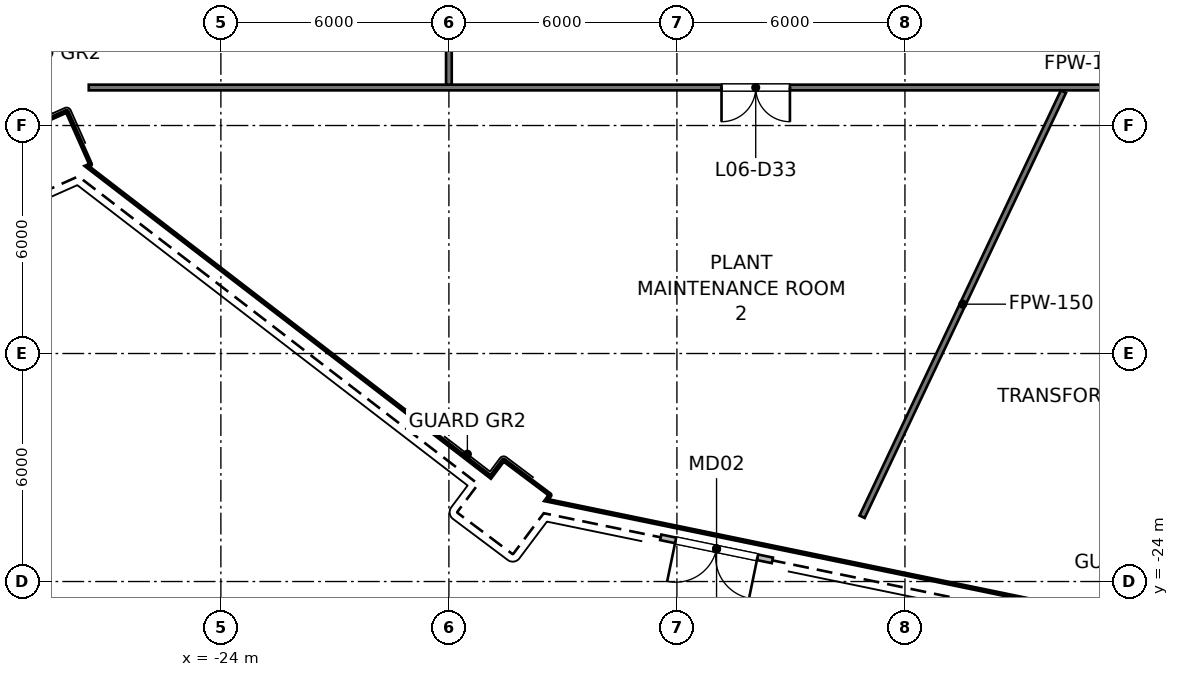
"""IFC4 building model, lengths in metres.
Left out: names, types, materials, properties, quantities, classifications, styles, units other than length and angle.
Written with IfcOpenShell. Run it as: python <this file> out.ifc"""

import sys

from ifc_helpers import new_model, si_unit, direction, frame, frame_2d, origin, place, context, subcontext, project, spatial, rectangle, extrude, element, fill, save


model = new_model("IFC4")
c1 = context("Model", 3, precision=1e-05, world=origin(), true_north=direction((0.0, 1.0)))
c2 = subcontext(c1, "Body", "Model", "MODEL_VIEW")
j1 = project(units=[si_unit("LENGTHUNIT", "METRE"), si_unit("PLANEANGLEUNIT", "RADIAN")], contexts=[c1])
p1 = place(None, origin())
s1 = spatial("IfcSite", under=j1, at=p1, CompositionType="ELEMENT")
p2 = place(p1, origin())
s2 = spatial("IfcBuilding", under=s1, at=p2, CompositionType="ELEMENT")
p3 = place(p2, frame((0.0, 0.0, 44.0)))
s3 = spatial("IfcBuildingStorey", under=s2, at=p3, CompositionType="ELEMENT", Elevation=44.0)
p4 = place(p3, frame((-9.488, -23.443, 0.0), z_axis=(0.0, 0.0, 1.0), x_axis=(-0.97938938672, 0.20198125948, 0.0)))
e1 = element("IfcWall", 1, at=p4, inside=s3, PredefinedType="SOLIDWALL", context=c2, shape_type="SweptSolid", body=[
    extrude(rectangle(XDim=3.0, YDim=0.15, at=frame_2d((1.5, 0.0))), origin(), (0.0, 0.0, 1.0), 2.5),
])
p5 = place(p4, frame((0.4, 0.0, 0.0)))
e2 = element("IfcOpeningElement", 2, at=p5, cuts=e1, PredefinedType="OPENING", context=c2, shape_type="SweptSolid", body=[
    extrude(rectangle(XDim=2.2, YDim=2.1, at=frame_2d((1.1, 1.05))), frame((0.0, 0.075, 0.0), z_axis=(0.0, -1.0, 0.0), x_axis=(1.0, 0.0, 0.0)), (0.0, 0.0, 1.0), 0.15),
])
p6 = place(p3, frame((-27.476, -11.0, 0.0), z_axis=(0.0, 0.0, 1.0), x_axis=(1.0, 0.0, 0.0)))
e3 = element("IfcWall", 3, at=p6, inside=s3, PredefinedType="PARTITIONING", context=c2, shape_type="SweptSolid", body=[
    extrude(rectangle(XDim=54.953, YDim=0.15, at=frame_2d((27.476, 0.0))), origin(), (0.0, 0.0, 1.0), 5.327),
])
p7 = place(p6, frame((27.9, 0.0, 0.0)))
e4 = element("IfcOpeningElement", 4, at=p7, cuts=e3, PredefinedType="OPENING", context=c2, shape_type="SweptSolid", body=[
    extrude(rectangle(XDim=1.0, YDim=2.1, at=frame_2d((0.5, 1.05))), frame((0.0, 0.075, 0.0), z_axis=(0.0, -1.0, 0.0), x_axis=(1.0, 0.0, 0.0)), (0.0, 0.0, 1.0), 0.15),
])
p8 = place(p6, frame((36.35, 0.0, 0.0)))
e5 = element("IfcOpeningElement", 5, at=p8, cuts=e3, PredefinedType="OPENING", context=c2, shape_type="SweptSolid", body=[
    extrude(rectangle(XDim=1.0, YDim=2.1, at=frame_2d((0.5, 1.05))), frame((0.0, 0.075, 0.0), z_axis=(0.0, -1.0, 0.0), x_axis=(1.0, 0.0, 0.0)), (0.0, 0.0, 1.0), 0.15),
])
p9 = place(p6, frame((43.55, 0.0, 0.0)))
e6 = element("IfcOpeningElement", 6, at=p9, cuts=e3, PredefinedType="OPENING", context=c2, shape_type="SweptSolid", body=[
    extrude(rectangle(XDim=1.0, YDim=2.1, at=frame_2d((0.5, 1.05))), frame((0.0, 0.075, 0.0), z_axis=(0.0, -1.0, 0.0), x_axis=(1.0, 0.0, 0.0)), (0.0, 0.0, 1.0), 0.15),
])
p10 = place(p6, frame((16.65, 0.0, 0.0)))
e7 = element("IfcOpeningElement", 7, at=p10, cuts=e3, PredefinedType="OPENING", context=c2, shape_type="SweptSolid", body=[
    extrude(rectangle(XDim=1.8, YDim=2.1, at=frame_2d((0.9, 1.05))), frame((0.0, 0.075, 0.0), z_axis=(0.0, -1.0, 0.0), x_axis=(1.0, 0.0, 0.0)), (0.0, 0.0, 1.0), 0.15),
])
p11 = place(p3, frame((-18.0, -10.925, 0.0), z_axis=(0.0, 0.0, 1.0), x_axis=(0.0, 1.0, 0.0)))
e8 = element("IfcWall", 8, at=p11, inside=s3, PredefinedType="PARTITIONING", context=c2, shape_type="SweptSolid", body=[
    extrude(rectangle(XDim=21.85, YDim=0.15, at=frame_2d((10.925, 0.0))), origin(), (0.0, 0.0, 1.0), 5.327),
])
p12 = place(p11, frame((4.95, 0.0, 0.0)))
e9 = element("IfcOpeningElement", 9, at=p12, cuts=e8, PredefinedType="OPENING", context=c2, shape_type="SweptSolid", body=[
    extrude(rectangle(XDim=1.0, YDim=2.1, at=frame_2d((0.5, 1.05))), frame((0.0, 0.075, 0.0), z_axis=(0.0, -1.0, 0.0), x_axis=(1.0, 0.0, 0.0)), (0.0, 0.0, 1.0), 0.15),
])
p13 = place(p11, frame((15.925, 0.0, 0.0)))
e10 = element("IfcOpeningElement", 10, at=p13, cuts=e8, PredefinedType="OPENING", context=c2, shape_type="SweptSolid", body=[
    extrude(rectangle(XDim=1.0, YDim=2.1, at=frame_2d((0.5, 1.05))), frame((0.0, 0.075, 0.0), z_axis=(0.0, -1.0, 0.0), x_axis=(1.0, 0.0, 0.0)), (0.0, 0.0, 1.0), 0.15),
])
p14 = place(p3, frame((-1.829, -11.107, 0.0), z_axis=(0.0, 0.0, 1.0), x_axis=(-0.427950706934, -0.903802075918, 0.0)))
e11 = element("IfcWall", 11, at=p14, inside=s3, PredefinedType="PARTITIONING", context=c2, shape_type="SweptSolid", body=[
    extrude(rectangle(XDim=12.38, YDim=0.15, at=frame_2d((6.19, 0.0))), origin(), (0.0, 0.0, 1.0), 5.395),
])
p15 = place(p5, origin())
e12 = element("IfcDoor", 12, at=p15, inside=s3, OperationType="DOUBLE_DOOR_SINGLE_SWING", PredefinedType="DOOR", context=c2, shape_type="SweptSolid", body=[
    extrude(rectangle(XDim=2.2, YDim=2.1, at=frame_2d((1.1, 1.05))), frame((0.0, 0.025, 0.0), z_axis=(0.0, -1.0, 0.0), x_axis=(1.0, 0.0, 0.0)), (0.0, 0.0, 1.0), 0.05),
])
fill(e2, e12)
p16 = place(p10, origin())
e13 = element("IfcDoor", 13, at=p16, inside=s3, OperationType="DOUBLE_DOOR_SINGLE_SWING", PredefinedType="DOOR", context=c2, shape_type="SweptSolid", body=[
    extrude(rectangle(XDim=1.8, YDim=2.1, at=frame_2d((0.9, 1.05))), frame((0.0, 0.025, 0.0), z_axis=(0.0, -1.0, 0.0), x_axis=(1.0, 0.0, 0.0)), (0.0, 0.0, 1.0), 0.05),
])
fill(e7, e13)
save(model, sys.argv[1])
